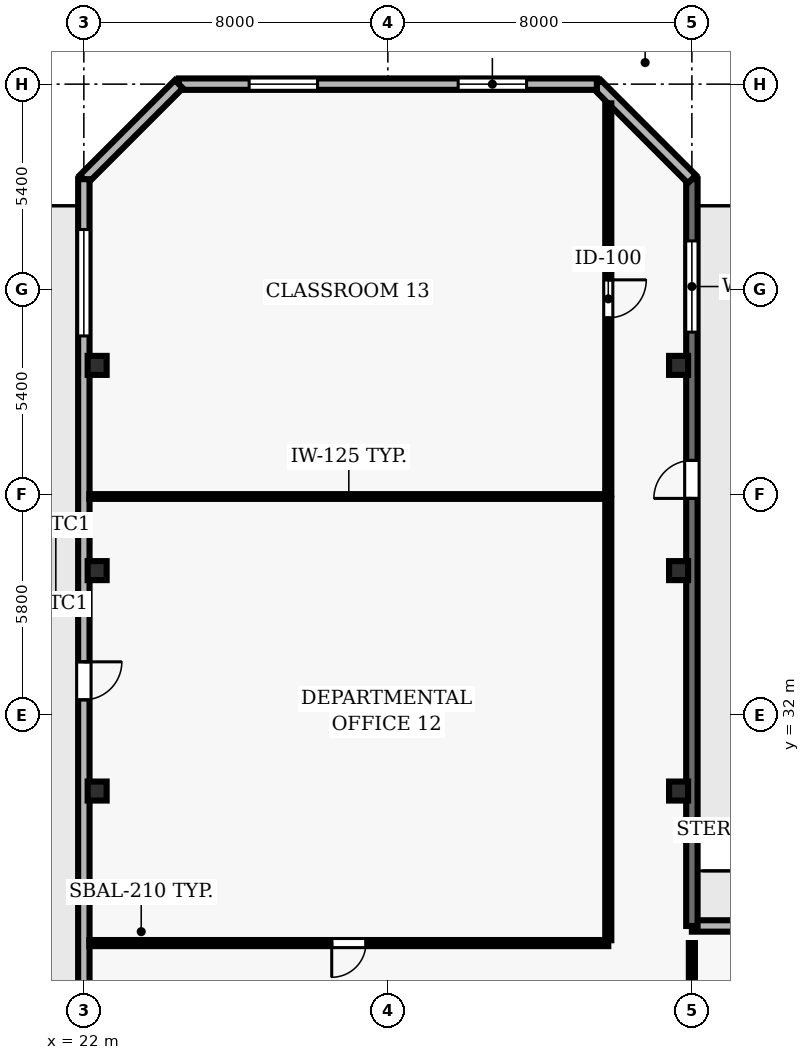
"""IFC4 building model, lengths in metres.
Left out: names, types, materials, properties, quantities, classifications, styles, units other than length and angle.
Written with IfcOpenShell. Run it as: python <this file> out.ifc"""

import sys

from ifc_helpers import new_model, si_unit, direction, frame, frame_2d, origin, origin_2d, place, context, subcontext, project, spatial, rectangle, hollow_rectangle, extrude, element, fill, save


model = new_model("IFC4")
c1 = context("Model", 3, precision=1e-05, world=origin(), true_north=direction((0.0, 1.0)))
c2 = subcontext(c1, "Body", "Model", "MODEL_VIEW")
j1 = project(units=[si_unit("LENGTHUNIT", "METRE"), si_unit("PLANEANGLEUNIT", "RADIAN")], contexts=[c1])
p1 = place(None, origin())
s1 = spatial("IfcSite", under=j1, at=p1, CompositionType="ELEMENT")
p2 = place(p1, origin())
s2 = spatial("IfcBuilding", under=s1, at=p2, CompositionType="ELEMENT")
p3 = place(p2, frame((0.0, 0.0, 134.6)))
s3 = spatial("IfcBuildingStorey", under=s2, at=p3, CompositionType="ELEMENT", Elevation=134.6)
for number, where, z_axis, x_axis in (
    (1, (22.35, 30.0, 0.0), (0.0, 0.0, 1.0), (1.0, 0.0, 0.0)),
    (2, (37.65, 30.0, 0.0), (0.0, 0.0, 1.0), (1.0, 0.0, 0.0)),
    (3, (22.35, 35.8, 0.0), (0.0, 0.0, 1.0), (1.0, 0.0, 0.0)),
    (4, (37.65, 35.8, 0.0), (0.0, 0.0, 1.0), (1.0, 0.0, 0.0)),
    (5, (22.35, 41.2, 0.0), (0.0, 0.0, 1.0), (1.0, 0.0, 0.0)),
    (6, (37.65, 41.2, 0.0), (0.0, 0.0, 1.0), (1.0, 0.0, 0.0)),
):
    element("IfcColumn", number, at=place(p3, frame(where, z_axis=z_axis, x_axis=x_axis)), inside=s3, PredefinedType="COLUMN", context=c2, shape_type="SweptSolid", body=[
        extrude(hollow_rectangle(XDim=0.5, YDim=0.5, WallThickness=0.025, at=origin_2d()), origin(), (0.0, 0.0, 1.0), 3.9),
    ])
p4 = place(p3, frame((45.499, 26.45, 0.0), z_axis=(0.0, 0.0, 1.0), x_axis=(-1.0, 0.0, 0.0)))
e7 = element("IfcWall", 7, at=p4, inside=s3, PredefinedType="SOLIDWALL", context=c2, shape_type="SweptSolid", body=[
    extrude(rectangle(XDim=7.499, YDim=0.3, at=frame_2d((3.75, 0.0))), origin(), (0.0, 0.0, 1.0), 3.69),
])
p5 = place(p4, frame((3.075, 0.0, 0.0)))
e8 = element("IfcOpeningElement", 8, at=p5, cuts=e7, PredefinedType="OPENING", context=c2, shape_type="SweptSolid", body=[
    extrude(rectangle(XDim=1.35, YDim=2.2, at=frame_2d((0.675, 1.1))), frame((0.0, 0.16, 0.0), z_axis=(0.0, -1.0, 0.0), x_axis=(1.0, 0.0, 0.0)), (0.0, 0.0, 1.0), 0.32),
])
p6 = place(p3, frame((38.0, 26.45, 0.0), z_axis=(0.0, 0.0, 1.0), x_axis=(0.0, 1.0, 0.0)))
e9 = element("IfcWall", 9, at=p6, inside=s3, PredefinedType="SOLIDWALL", context=c2, shape_type="SweptSolid", body=[
    extrude(rectangle(XDim=19.65, YDim=0.3, at=frame_2d((9.825, 0.0))), origin(), (0.0, 0.0, 1.0), 3.69),
])
p7 = place(p6, frame((11.25, 0.0, 0.0)))
e10 = element("IfcOpeningElement", 10, at=p7, cuts=e9, PredefinedType="OPENING", context=c2, shape_type="SweptSolid", body=[
    extrude(rectangle(XDim=1.0, YDim=2.2, at=frame_2d((0.5, 1.1))), frame((0.0, 0.16, 0.0), z_axis=(0.0, -1.0, 0.0), x_axis=(1.0, 0.0, 0.0)), (0.0, 0.0, 1.0), 0.32),
])
p8 = place(p6, frame((15.625, 0.0, 0.9)))
e11 = element("IfcOpeningElement", 11, at=p8, cuts=e9, PredefinedType="OPENING", context=c2, shape_type="SweptSolid", body=[
    extrude(rectangle(XDim=2.4, YDim=1.6, at=frame_2d((1.2, 0.8))), frame((0.0, 0.16, 0.0), z_axis=(0.0, -1.0, 0.0), x_axis=(1.0, 0.0, 0.0)), (0.0, 0.0, 1.0), 0.32),
])
p9 = place(p3, frame((38.0, 46.1, 0.0), z_axis=(0.0, 0.0, 1.0), x_axis=(-0.707106781187, 0.707106781187, 0.0)))
e12 = element("IfcWall", 12, at=p9, inside=s3, PredefinedType="SOLIDWALL", context=c2, shape_type="SweptSolid", body=[
    extrude(rectangle(XDim=3.536, YDim=0.3, at=frame_2d((1.768, 0.0))), origin(), (0.0, 0.0, 1.0), 3.69),
])
p10 = place(p3, frame((35.5, 48.6, 0.0), z_axis=(0.0, 0.0, 1.0), x_axis=(-1.0, 0.0, 0.0)))
e13 = element("IfcWall", 13, at=p10, inside=s3, PredefinedType="SOLIDWALL", context=c2, shape_type="SweptSolid", body=[
    extrude(rectangle(XDim=11.0, YDim=0.3, at=frame_2d((5.5, 0.0))), origin(), (0.0, 0.0, 1.0), 3.69),
])
p11 = place(p10, frame((1.85, 0.0, 0.9)))
e14 = element("IfcOpeningElement", 14, at=p11, cuts=e13, PredefinedType="OPENING", context=c2, shape_type="SweptSolid", body=[
    extrude(rectangle(XDim=1.8, YDim=1.8, at=frame_2d((0.9, 0.9))), frame((0.0, 0.16, 0.0), z_axis=(0.0, -1.0, 0.0), x_axis=(1.0, 0.0, 0.0)), (0.0, 0.0, 1.0), 0.32),
])
p12 = place(p10, frame((7.35, 0.0, 0.9)))
e15 = element("IfcOpeningElement", 15, at=p12, cuts=e13, PredefinedType="OPENING", context=c2, shape_type="SweptSolid", body=[
    extrude(rectangle(XDim=1.8, YDim=1.8, at=frame_2d((0.9, 0.9))), frame((0.0, 0.16, 0.0), z_axis=(0.0, -1.0, 0.0), x_axis=(1.0, 0.0, 0.0)), (0.0, 0.0, 1.0), 0.32),
])
p13 = place(p3, frame((24.5, 48.6, 0.0), z_axis=(0.0, 0.0, 1.0), x_axis=(-0.707106781187, -0.707106781187, 0.0)))
e16 = element("IfcWall", 16, at=p13, inside=s3, PredefinedType="SOLIDWALL", context=c2, shape_type="SweptSolid", body=[
    extrude(rectangle(XDim=3.536, YDim=0.3, at=frame_2d((1.768, 0.0))), origin(), (0.0, 0.0, 1.0), 3.69),
])
p14 = place(p3, frame((22.0, 46.1, 0.0), z_axis=(0.0, 0.0, 1.0), x_axis=(0.0, -1.0, 0.0)))
e17 = element("IfcWall", 17, at=p14, inside=s3, PredefinedType="SOLIDWALL", context=c2, shape_type="SweptSolid", body=[
    extrude(rectangle(XDim=43.6, YDim=0.3, at=frame_2d((21.8, 0.0))), origin(), (0.0, 0.0, 1.0), 3.69),
])
p15 = place(p14, frame((12.7, 0.0, 0.0)))
e18 = element("IfcOpeningElement", 18, at=p15, cuts=e17, PredefinedType="OPENING", context=c2, shape_type="SweptSolid", body=[
    extrude(rectangle(XDim=1.0, YDim=2.2, at=frame_2d((0.5, 1.1))), frame((0.0, 0.16, 0.0), z_axis=(0.0, -1.0, 0.0), x_axis=(1.0, 0.0, 0.0)), (0.0, 0.0, 1.0), 0.32),
])
p16 = place(p14, frame((1.325, 0.0, 0.9)))
e19 = element("IfcOpeningElement", 19, at=p16, cuts=e17, PredefinedType="OPENING", context=c2, shape_type="SweptSolid", body=[
    extrude(rectangle(XDim=2.8, YDim=1.8, at=frame_2d((1.4, 0.9))), frame((0.0, 0.16, 0.0), z_axis=(0.0, -1.0, 0.0), x_axis=(1.0, 0.0, 0.0)), (0.0, 0.0, 1.0), 0.32),
])
p17 = place(p14, frame((23.575, 0.0, 0.9)))
e20 = element("IfcOpeningElement", 20, at=p17, cuts=e17, PredefinedType="OPENING", context=c2, shape_type="SweptSolid", body=[
    extrude(rectangle(XDim=2.8, YDim=1.8, at=frame_2d((1.4, 0.9))), frame((0.0, 0.16, 0.0), z_axis=(0.0, -1.0, 0.0), x_axis=(1.0, 0.0, 0.0)), (0.0, 0.0, 1.0), 0.32),
])
p18 = place(p14, frame((27.675, 0.0, 0.9)))
e21 = element("IfcOpeningElement", 21, at=p18, cuts=e17, PredefinedType="OPENING", context=c2, shape_type="SweptSolid", body=[
    extrude(rectangle(XDim=2.8, YDim=1.8, at=frame_2d((1.4, 0.9))), frame((0.0, 0.16, 0.0), z_axis=(0.0, -1.0, 0.0), x_axis=(1.0, 0.0, 0.0)), (0.0, 0.0, 1.0), 0.32),
])
p19 = place(p14, frame((34.025, 0.0, 0.9)))
e22 = element("IfcOpeningElement", 22, at=p19, cuts=e17, PredefinedType="OPENING", context=c2, shape_type="SweptSolid", body=[
    extrude(rectangle(XDim=2.8, YDim=1.8, at=frame_2d((1.4, 0.9))), frame((0.0, 0.16, 0.0), z_axis=(0.0, -1.0, 0.0), x_axis=(1.0, 0.0, 0.0)), (0.0, 0.0, 1.0), 0.32),
])
p20 = place(p3, frame((35.8, 26.0, 0.0), z_axis=(0.0, 0.0, 1.0), x_axis=(-1.0, 0.0, 0.0)))
e23 = element("IfcWall", 23, at=p20, inside=s3, PredefinedType="PARTITIONING", context=c2, shape_type="SweptSolid", body=[
    extrude(rectangle(XDim=13.655, YDim=0.16, at=frame_2d((6.828, 0.0))), origin(), (0.0, 0.0, 1.0), 3.69),
])
p21 = place(p20, frame((6.377, 0.0, 0.0)))
e24 = element("IfcOpeningElement", 24, at=p21, cuts=e23, PredefinedType="OPENING", context=c2, shape_type="SweptSolid", body=[
    extrude(rectangle(XDim=0.9, YDim=2.1, at=frame_2d((0.45, 1.05))), frame((0.0, 0.09, 0.0), z_axis=(0.0, -1.0, 0.0), x_axis=(1.0, 0.0, 0.0)), (0.0, 0.0, 1.0), 0.18),
])
p22 = place(p3, frame((35.8, 37.75, 0.0), z_axis=(0.0, 0.0, 1.0), x_axis=(-1.0, 0.0, 0.0)))
e25 = element("IfcWall", 25, at=p22, inside=s3, PredefinedType="PARTITIONING", context=c2, shape_type="SweptSolid", body=[
    extrude(rectangle(XDim=13.655, YDim=0.125, at=frame_2d((6.828, 0.0))), origin(), (0.0, 0.0, 1.0), 3.69),
])
p23 = place(p3, frame((35.8, 37.693, 0.0), z_axis=(0.0, 0.0, 1.0), x_axis=(0.0, -1.0, 0.0)))
e26 = element("IfcWall", 26, at=p23, inside=s3, PredefinedType="PARTITIONING", context=c2, shape_type="SweptSolid", body=[
    extrude(rectangle(XDim=11.618, YDim=0.16, at=frame_2d((5.809, 0.0))), origin(), (0.0, 0.0, 1.0), 3.69),
])
p24 = place(p3, frame((35.8, 48.095, 0.0), z_axis=(0.0, 0.0, 1.0), x_axis=(0.0, -1.0, 0.0)))
e27 = element("IfcWall", 27, at=p24, inside=s3, PredefinedType="PARTITIONING", context=c2, shape_type="SweptSolid", body=[
    extrude(rectangle(XDim=10.288, YDim=0.16, at=frame_2d((5.144, 0.0))), origin(), (0.0, 0.0, 1.0), 3.69),
])
p25 = place(p24, frame((4.644, 0.0, 0.0)))
e28 = element("IfcOpeningElement", 28, at=p25, cuts=e27, PredefinedType="OPENING", context=c2, shape_type="SweptSolid", body=[
    extrude(rectangle(XDim=1.0, YDim=2.1, at=frame_2d((0.5, 1.05))), frame((0.0, 0.09, 0.0), z_axis=(0.0, -1.0, 0.0), x_axis=(1.0, 0.0, 0.0)), (0.0, 0.0, 1.0), 0.18),
])
p26 = place(p3, frame((38.0, 23.85, 0.0), z_axis=(0.0, 0.0, 1.0), x_axis=(0.0, 1.0, 0.0)))
e29 = element("IfcWall", 29, at=p26, inside=s3, PredefinedType="PARTITIONING", context=c2, shape_type="SweptSolid", body=[
    extrude(rectangle(XDim=2.15, YDim=0.16, at=frame_2d((1.075, 0.0))), origin(), (0.0, 0.0, 1.0), 3.074),
])
p27 = place(p7, origin())
e30 = element("IfcDoor", 30, at=p27, inside=s3, OperationType="SINGLE_SWING_LEFT", PredefinedType="DOOR", context=c2, shape_type="SweptSolid", body=[
    extrude(rectangle(XDim=1.0, YDim=2.2, at=frame_2d((0.5, 1.1))), frame((0.0, 0.025, 0.0), z_axis=(0.0, -1.0, 0.0), x_axis=(1.0, 0.0, 0.0)), (0.0, 0.0, 1.0), 0.05),
])
fill(e10, e30)
p28 = place(p8, origin())
e31 = element("IfcWindow", 31, at=p28, inside=s3, PartitioningType="SINGLE_PANEL", PredefinedType="WINDOW", context=c2, shape_type="SweptSolid", body=[
    extrude(rectangle(XDim=2.4, YDim=1.6, at=frame_2d((1.2, 0.8))), frame((0.0, 0.03, 0.0), z_axis=(0.0, -1.0, 0.0), x_axis=(1.0, 0.0, 0.0)), (0.0, 0.0, 1.0), 0.06),
])
fill(e11, e31)
p29 = place(p11, origin())
e32 = element("IfcWindow", 32, at=p29, inside=s3, PartitioningType="SINGLE_PANEL", PredefinedType="WINDOW", context=c2, shape_type="SweptSolid", body=[
    extrude(rectangle(XDim=1.8, YDim=1.8, at=frame_2d((0.9, 0.9))), frame((0.0, 0.03, 0.0), z_axis=(0.0, -1.0, 0.0), x_axis=(1.0, 0.0, 0.0)), (0.0, 0.0, 1.0), 0.06),
])
fill(e14, e32)
p30 = place(p12, origin())
e33 = element("IfcWindow", 33, at=p30, inside=s3, PartitioningType="SINGLE_PANEL", PredefinedType="WINDOW", context=c2, shape_type="SweptSolid", body=[
    extrude(rectangle(XDim=1.8, YDim=1.8, at=frame_2d((0.9, 0.9))), frame((0.0, 0.03, 0.0), z_axis=(0.0, -1.0, 0.0), x_axis=(1.0, 0.0, 0.0)), (0.0, 0.0, 1.0), 0.06),
])
fill(e15, e33)
p31 = place(p15, origin())
e34 = element("IfcDoor", 34, at=p31, inside=s3, OperationType="SINGLE_SWING_LEFT", PredefinedType="DOOR", context=c2, shape_type="SweptSolid", body=[
    extrude(rectangle(XDim=1.0, YDim=2.2, at=frame_2d((0.5, 1.1))), frame((0.0, 0.025, 0.0), z_axis=(0.0, -1.0, 0.0), x_axis=(1.0, 0.0, 0.0)), (0.0, 0.0, 1.0), 0.05),
])
fill(e18, e34)
p32 = place(p16, origin())
e35 = element("IfcWindow", 35, at=p32, inside=s3, PartitioningType="SINGLE_PANEL", PredefinedType="WINDOW", context=c2, shape_type="SweptSolid", body=[
    extrude(rectangle(XDim=2.8, YDim=1.8, at=frame_2d((1.4, 0.9))), frame((0.0, 0.03, 0.0), z_axis=(0.0, -1.0, 0.0), x_axis=(1.0, 0.0, 0.0)), (0.0, 0.0, 1.0), 0.06),
])
fill(e19, e35)
p33 = place(p21, origin())
e36 = element("IfcDoor", 36, at=p33, inside=s3, OperationType="SINGLE_SWING_RIGHT", PredefinedType="DOOR", context=c2, shape_type="SweptSolid", body=[
    extrude(rectangle(XDim=0.9, YDim=2.1, at=frame_2d((0.45, 1.05))), frame((0.0, 0.025, 0.0), z_axis=(0.0, -1.0, 0.0), x_axis=(1.0, 0.0, 0.0)), (0.0, 0.0, 1.0), 0.05),
])
fill(e24, e36)
p34 = place(p25, origin())
e37 = element("IfcDoor", 37, at=p34, inside=s3, OperationType="SINGLE_SWING_LEFT", PredefinedType="DOOR", context=c2, shape_type="SweptSolid", body=[
    extrude(rectangle(XDim=1.0, YDim=2.1, at=frame_2d((0.5, 1.05))), frame((0.0, 0.025, 0.0), z_axis=(0.0, -1.0, 0.0), x_axis=(1.0, 0.0, 0.0)), (0.0, 0.0, 1.0), 0.05),
])
fill(e28, e37)
save(model, sys.argv[1])
